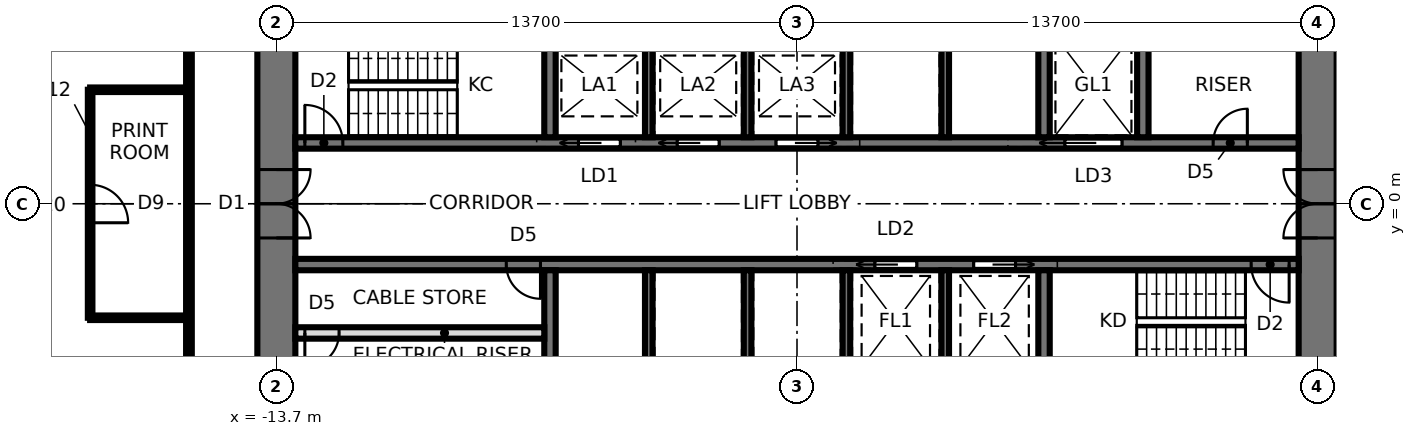
"""IFC4 building model, lengths in metres.
Left out: names, types, materials, properties, quantities, classifications, styles, units other than length and angle.
Written with IfcOpenShell. Run it as: python <this file> out.ifc"""

import sys

from ifc_helpers import new_model, si_unit, direction, frame, frame_2d, origin, place, context, subcontext, project, spatial, rectangle, extrude, element, fill, save


model = new_model("IFC4")
c1 = context("Model", 3, precision=1e-05, world=origin(), true_north=direction((0.0, 1.0)))
c2 = subcontext(c1, "Body", "Model", "MODEL_VIEW")
j1 = project(units=[si_unit("LENGTHUNIT", "METRE"), si_unit("PLANEANGLEUNIT", "RADIAN")], contexts=[c1])
p1 = place(None, origin())
s1 = spatial("IfcSite", under=j1, at=p1, CompositionType="ELEMENT")
p2 = place(p1, origin())
s2 = spatial("IfcBuilding", under=s1, at=p2, CompositionType="ELEMENT")
p3 = place(p2, frame((0.0, 0.0, 78.4)))
s3 = spatial("IfcBuildingStorey", under=s2, at=p3, CompositionType="ELEMENT", Elevation=78.4)
p4 = place(p3, frame((13.7, -9.5, 0.0), z_axis=(0.0, 0.0, 1.0), x_axis=(0.0, 1.0, 0.0)))
e1 = element("IfcWall", 1, at=p4, inside=s3, PredefinedType="SHEAR", context=c2, shape_type="SweptSolid", body=[
    extrude(rectangle(XDim=19.0, YDim=1.0, at=frame_2d((9.5, 0.0))), origin(), (0.0, 0.0, 1.0), 4.2),
])
p5 = place(p4, frame((8.6, 0.0, 0.0)))
e2 = element("IfcOpeningElement", 2, at=p5, cuts=e1, PredefinedType="OPENING", context=c2, shape_type="SweptSolid", body=[
    extrude(rectangle(XDim=1.8, YDim=2.4, at=frame_2d((0.9, 1.2))), frame((0.0, 0.51, 0.0), z_axis=(0.0, -1.0, 0.0), x_axis=(1.0, 0.0, 0.0)), (0.0, 0.0, 1.0), 1.02),
])
p6 = place(p3, frame((-13.7, 9.5, 0.0), z_axis=(0.0, 0.0, 1.0), x_axis=(0.0, -1.0, 0.0)))
e3 = element("IfcWall", 3, at=p6, inside=s3, PredefinedType="SHEAR", context=c2, shape_type="SweptSolid", body=[
    extrude(rectangle(XDim=19.0, YDim=1.0, at=frame_2d((9.5, 0.0))), origin(), (0.0, 0.0, 1.0), 4.2),
])
p7 = place(p6, frame((8.6, 0.0, 0.0)))
e4 = element("IfcOpeningElement", 4, at=p7, cuts=e3, PredefinedType="OPENING", context=c2, shape_type="SweptSolid", body=[
    extrude(rectangle(XDim=1.8, YDim=2.4, at=frame_2d((0.9, 1.2))), frame((0.0, 0.51, 0.0), z_axis=(0.0, -1.0, 0.0), x_axis=(1.0, 0.0, 0.0)), (0.0, 0.0, 1.0), 1.02),
])
p8 = place(p3, frame((-13.2, 1.6, 0.0), z_axis=(0.0, 0.0, 1.0), x_axis=(1.0, 0.0, 0.0)))
e5 = element("IfcWall", 5, at=p8, inside=s3, PredefinedType="SHEAR", context=c2, shape_type="SweptSolid", body=[
    extrude(rectangle(XDim=26.4, YDim=0.3, at=frame_2d((13.2, 0.0))), origin(), (0.0, 0.0, 1.0), 4.2),
])
p9 = place(p8, frame((0.25, 0.0, 0.0)))
e6 = element("IfcOpeningElement", 6, at=p9, cuts=e5, PredefinedType="OPENING", context=c2, shape_type="SweptSolid", body=[
    extrude(rectangle(XDim=1.0, YDim=2.1, at=frame_2d((0.5, 1.05))), frame((0.0, 0.16, 0.0), z_axis=(0.0, -1.0, 0.0), x_axis=(1.0, 0.0, 0.0)), (0.0, 0.0, 1.0), 0.32),
])
p10 = place(p8, frame((20.25, 0.0, 0.0)))
e7 = element("IfcOpeningElement", 7, at=p10, cuts=e5, PredefinedType="OPENING", context=c2, shape_type="SweptSolid", body=[
    extrude(rectangle(XDim=1.5, YDim=2.4, at=frame_2d((0.75, 1.2))), frame((0.0, 0.16, 0.0), z_axis=(0.0, -1.0, 0.0), x_axis=(1.0, 0.0, 0.0)), (0.0, 0.0, 1.0), 0.32),
])
p11 = place(p8, frame((7.45, 0.0, 0.0)))
e8 = element("IfcOpeningElement", 8, at=p11, cuts=e5, PredefinedType="OPENING", context=c2, shape_type="SweptSolid", body=[
    extrude(rectangle(XDim=1.1, YDim=2.3, at=frame_2d((0.55, 1.15))), frame((0.0, 0.16, 0.0), z_axis=(0.0, -1.0, 0.0), x_axis=(1.0, 0.0, 0.0)), (0.0, 0.0, 1.0), 0.32),
])
p12 = place(p8, frame((10.05, 0.0, 0.0)))
e9 = element("IfcOpeningElement", 9, at=p12, cuts=e5, PredefinedType="OPENING", context=c2, shape_type="SweptSolid", body=[
    extrude(rectangle(XDim=1.1, YDim=2.3, at=frame_2d((0.55, 1.15))), frame((0.0, 0.16, 0.0), z_axis=(0.0, -1.0, 0.0), x_axis=(1.0, 0.0, 0.0)), (0.0, 0.0, 1.0), 0.32),
])
p13 = place(p8, frame((12.65, 0.0, 0.0)))
e10 = element("IfcOpeningElement", 10, at=p13, cuts=e5, PredefinedType="OPENING", context=c2, shape_type="SweptSolid", body=[
    extrude(rectangle(XDim=1.1, YDim=2.3, at=frame_2d((0.55, 1.15))), frame((0.0, 0.16, 0.0), z_axis=(0.0, -1.0, 0.0), x_axis=(1.0, 0.0, 0.0)), (0.0, 0.0, 1.0), 0.32),
])
p14 = place(p8, frame((24.15, 0.0, 0.0)))
e11 = element("IfcOpeningElement", 11, at=p14, cuts=e5, PredefinedType="OPENING", context=c2, shape_type="SweptSolid", body=[
    extrude(rectangle(XDim=0.9, YDim=2.1, at=frame_2d((0.45, 1.05))), frame((0.0, 0.16, 0.0), z_axis=(0.0, -1.0, 0.0), x_axis=(1.0, 0.0, 0.0)), (0.0, 0.0, 1.0), 0.32),
])
p15 = place(p3, frame((-13.2, -1.6, 0.0), z_axis=(0.0, 0.0, 1.0), x_axis=(1.0, 0.0, 0.0)))
e12 = element("IfcWall", 12, at=p15, inside=s3, PredefinedType="SHEAR", context=c2, shape_type="SweptSolid", body=[
    extrude(rectangle(XDim=26.4, YDim=0.3, at=frame_2d((13.2, 0.0))), origin(), (0.0, 0.0, 1.0), 4.2),
])
p16 = place(p15, frame((25.15, 0.0, 0.0)))
e13 = element("IfcOpeningElement", 13, at=p16, cuts=e12, PredefinedType="OPENING", context=c2, shape_type="SweptSolid", body=[
    extrude(rectangle(XDim=1.0, YDim=2.1, at=frame_2d((0.5, 1.05))), frame((0.0, 0.16, 0.0), z_axis=(0.0, -1.0, 0.0), x_axis=(1.0, 0.0, 0.0)), (0.0, 0.0, 1.0), 0.32),
])
p17 = place(p15, frame((15.25, 0.0, 0.0)))
e14 = element("IfcOpeningElement", 14, at=p17, cuts=e12, PredefinedType="OPENING", context=c2, shape_type="SweptSolid", body=[
    extrude(rectangle(XDim=1.1, YDim=2.3, at=frame_2d((0.55, 1.15))), frame((0.0, 0.16, 0.0), z_axis=(0.0, -1.0, 0.0), x_axis=(1.0, 0.0, 0.0)), (0.0, 0.0, 1.0), 0.32),
])
p18 = place(p15, frame((17.85, 0.0, 0.0)))
e15 = element("IfcOpeningElement", 15, at=p18, cuts=e12, PredefinedType="OPENING", context=c2, shape_type="SweptSolid", body=[
    extrude(rectangle(XDim=1.1, YDim=2.3, at=frame_2d((0.55, 1.15))), frame((0.0, 0.16, 0.0), z_axis=(0.0, -1.0, 0.0), x_axis=(1.0, 0.0, 0.0)), (0.0, 0.0, 1.0), 0.32),
])
p19 = place(p15, frame((5.55, 0.0, 0.0)))
e16 = element("IfcOpeningElement", 16, at=p19, cuts=e12, PredefinedType="OPENING", context=c2, shape_type="SweptSolid", body=[
    extrude(rectangle(XDim=0.9, YDim=2.1, at=frame_2d((0.45, 1.05))), frame((0.0, 0.16, 0.0), z_axis=(0.0, -1.0, 0.0), x_axis=(1.0, 0.0, 0.0)), (0.0, 0.0, 1.0), 0.32),
])
for number, where, z_axis, x_axis in (
    (17, (-6.5, 1.75, 0.0), (0.0, 0.0, 1.0), (0.0, 1.0, 0.0)),
    (18, (6.5, 1.75, 0.0), (0.0, 0.0, 1.0), (0.0, 1.0, 0.0)),
):
    element("IfcWall", number, at=place(p3, frame(where, z_axis=z_axis, x_axis=x_axis)), inside=s3, PredefinedType="SHEAR", context=c2, shape_type="SweptSolid", body=[
        extrude(rectangle(XDim=2.7, YDim=0.3, at=frame_2d((1.35, 0.0))), origin(), (0.0, 0.0, 1.0), 4.2),
    ])
for number, where, z_axis, x_axis in (
    (19, (-3.9, 1.75, 0.0), (0.0, 0.0, 1.0), (0.0, 1.0, 0.0)),
    (20, (-1.3, 1.75, 0.0), (0.0, 0.0, 1.0), (0.0, 1.0, 0.0)),
    (21, (1.3, 1.75, 0.0), (0.0, 0.0, 1.0), (0.0, 1.0, 0.0)),
    (22, (3.9, 1.75, 0.0), (0.0, 0.0, 1.0), (0.0, 1.0, 0.0)),
):
    element("IfcWall", number, at=place(p3, frame(where, z_axis=z_axis, x_axis=x_axis)), inside=s3, PredefinedType="SHEAR", context=c2, shape_type="SweptSolid", body=[
        extrude(rectangle(XDim=2.7, YDim=0.2, at=frame_2d((1.35, 0.0))), origin(), (0.0, 0.0, 1.0), 4.2),
    ])
for number, where, z_axis, x_axis in (
    (23, (-6.5, -1.75, 0.0), (0.0, 0.0, 1.0), (0.0, -1.0, 0.0)),
    (24, (6.5, -1.75, 0.0), (0.0, 0.0, 1.0), (0.0, -1.0, 0.0)),
):
    element("IfcWall", number, at=place(p3, frame(where, z_axis=z_axis, x_axis=x_axis)), inside=s3, PredefinedType="SHEAR", context=c2, shape_type="SweptSolid", body=[
        extrude(rectangle(XDim=2.7, YDim=0.3, at=frame_2d((1.35, 0.0))), origin(), (0.0, 0.0, 1.0), 4.2),
    ])
for number, where, z_axis, x_axis in (
    (25, (-3.9, -1.75, 0.0), (0.0, 0.0, 1.0), (0.0, -1.0, 0.0)),
    (26, (-1.3, -1.75, 0.0), (0.0, 0.0, 1.0), (0.0, -1.0, 0.0)),
    (27, (1.3, -1.75, 0.0), (0.0, 0.0, 1.0), (0.0, -1.0, 0.0)),
    (28, (3.9, -1.75, 0.0), (0.0, 0.0, 1.0), (0.0, -1.0, 0.0)),
):
    element("IfcWall", number, at=place(p3, frame(where, z_axis=z_axis, x_axis=x_axis)), inside=s3, PredefinedType="SHEAR", context=c2, shape_type="SweptSolid", body=[
        extrude(rectangle(XDim=2.7, YDim=0.2, at=frame_2d((1.35, 0.0))), origin(), (0.0, 0.0, 1.0), 4.2),
    ])
p20 = place(p3, frame((9.1, 1.75, 0.0), z_axis=(0.0, 0.0, 1.0), x_axis=(0.0, 1.0, 0.0)))
e29 = element("IfcWall", 29, at=p20, inside=s3, PredefinedType="SHEAR", context=c2, shape_type="SweptSolid", body=[
    extrude(rectangle(XDim=2.7, YDim=0.3, at=frame_2d((1.35, 0.0))), origin(), (0.0, 0.0, 1.0), 4.2),
])
p21 = place(p3, frame((-13.2, -3.4, 0.0), z_axis=(0.0, 0.0, 1.0), x_axis=(1.0, 0.0, 0.0)))
e30 = element("IfcWall", 30, at=p21, inside=s3, PredefinedType="SOLIDWALL", context=c2, shape_type="SweptSolid", body=[
    extrude(rectangle(XDim=6.55, YDim=0.3, at=frame_2d((3.275, 0.0))), origin(), (0.0, 0.0, 1.0), 4.04),
])
p22 = place(p21, frame((0.25, 0.0, 0.0)))
e31 = element("IfcOpeningElement", 31, at=p22, cuts=e30, PredefinedType="OPENING", context=c2, shape_type="SweptSolid", body=[
    extrude(rectangle(XDim=0.9, YDim=2.1, at=frame_2d((0.45, 1.05))), frame((0.0, 0.16, 0.0), z_axis=(0.0, -1.0, 0.0), x_axis=(1.0, 0.0, 0.0)), (0.0, 0.0, 1.0), 0.32),
])
for number, where, z_axis, x_axis in (
    (32, (-18.6, -3.0, 0.0), (0.0, 0.0, 1.0), (1.0, 0.0, 0.0)),
    (33, (-16.0, 3.0, 0.0), (0.0, 0.0, 1.0), (-1.0, 0.0, 0.0)),
):
    element("IfcWall", number, at=place(p3, frame(where, z_axis=z_axis, x_axis=x_axis)), inside=s3, PredefinedType="PARTITIONING", context=c2, shape_type="SweptSolid", body=[
        extrude(rectangle(XDim=2.6, YDim=0.12, at=frame_2d((1.3, 0.0))), origin(), (0.0, 0.0, 1.0), 4.04),
    ])
p23 = place(p3, frame((-18.6, 3.0, 0.0), z_axis=(0.0, 0.0, 1.0), x_axis=(0.0, -1.0, 0.0)))
e34 = element("IfcWall", 34, at=p23, inside=s3, PredefinedType="PARTITIONING", context=c2, shape_type="SweptSolid", body=[
    extrude(rectangle(XDim=6.0, YDim=0.12, at=frame_2d((3.0, 0.0))), origin(), (0.0, 0.0, 1.0), 4.04),
])
p24 = place(p23, frame((2.5, 0.0, 0.0)))
e35 = element("IfcOpeningElement", 35, at=p24, cuts=e34, PredefinedType="OPENING", context=c2, shape_type="SweptSolid", body=[
    extrude(rectangle(XDim=1.0, YDim=2.4, at=frame_2d((0.5, 1.2))), frame((0.0, 0.07, 0.0), z_axis=(0.0, -1.0, 0.0), x_axis=(1.0, 0.0, 0.0)), (0.0, 0.0, 1.0), 0.14),
])
p25 = place(p3, frame((-16.0, 11.3, 0.0), z_axis=(0.0, 0.0, 1.0), x_axis=(0.0, -1.0, 0.0)))
e36 = element("IfcWall", 36, at=p25, inside=s3, PredefinedType="PARTITIONING", context=c2, shape_type="SweptSolid", body=[
    extrude(rectangle(XDim=22.6, YDim=0.15, at=frame_2d((11.3, 0.0))), origin(), (0.0, 0.0, 1.0), 4.04),
])
p26 = place(p25, frame((17.85, 0.0, 0.0)))
e37 = element("IfcOpeningElement", 37, at=p26, cuts=e36, PredefinedType="OPENING", context=c2, shape_type="SweptSolid", body=[
    extrude(rectangle(XDim=1.2, YDim=2.4, at=frame_2d((0.6, 1.2))), frame((0.0, 0.085, 0.0), z_axis=(0.0, -1.0, 0.0), x_axis=(1.0, 0.0, 0.0)), (0.0, 0.0, 1.0), 0.17),
])
p27 = place(p7, origin())
e38 = element("IfcDoor", 38, at=p27, inside=s3, OperationType="DOUBLE_DOOR_SINGLE_SWING", PredefinedType="DOOR", context=c2, shape_type="SweptSolid", body=[
    extrude(rectangle(XDim=1.72, YDim=2.36, at=frame_2d((0.9, 1.18))), frame((0.0, 0.025, 0.0), z_axis=(0.0, -1.0, 0.0), x_axis=(1.0, 0.0, 0.0)), (0.0, 0.0, 1.0), 0.05),
    extrude(rectangle(XDim=0.04, YDim=2.4, at=frame_2d((0.02, 1.2))), frame((0.0, 0.25, 0.0), z_axis=(0.0, -1.0, 0.0), x_axis=(1.0, 0.0, 0.0)), (0.0, 0.0, 1.0), 0.5),
    extrude(rectangle(XDim=0.04, YDim=2.4, at=frame_2d((1.78, 1.2))), frame((0.0, 0.25, 0.0), z_axis=(0.0, -1.0, 0.0), x_axis=(1.0, 0.0, 0.0)), (0.0, 0.0, 1.0), 0.5),
    extrude(rectangle(XDim=1.72, YDim=0.04, at=frame_2d((0.9, 2.38))), frame((0.0, 0.25, 0.0), z_axis=(0.0, -1.0, 0.0), x_axis=(1.0, 0.0, 0.0)), (0.0, 0.0, 1.0), 0.5),
])
fill(e4, e38)
p28 = place(p5, origin())
e39 = element("IfcDoor", 39, at=p28, inside=s3, OperationType="DOUBLE_DOOR_SINGLE_SWING", PredefinedType="DOOR", context=c2, shape_type="SweptSolid", body=[
    extrude(rectangle(XDim=1.72, YDim=2.36, at=frame_2d((0.9, 1.18))), frame((0.0, 0.025, 0.0), z_axis=(0.0, -1.0, 0.0), x_axis=(1.0, 0.0, 0.0)), (0.0, 0.0, 1.0), 0.05),
    extrude(rectangle(XDim=0.04, YDim=2.4, at=frame_2d((0.02, 1.2))), frame((0.0, 0.25, 0.0), z_axis=(0.0, -1.0, 0.0), x_axis=(1.0, 0.0, 0.0)), (0.0, 0.0, 1.0), 0.5),
    extrude(rectangle(XDim=0.04, YDim=2.4, at=frame_2d((1.78, 1.2))), frame((0.0, 0.25, 0.0), z_axis=(0.0, -1.0, 0.0), x_axis=(1.0, 0.0, 0.0)), (0.0, 0.0, 1.0), 0.5),
    extrude(rectangle(XDim=1.72, YDim=0.04, at=frame_2d((0.9, 2.38))), frame((0.0, 0.25, 0.0), z_axis=(0.0, -1.0, 0.0), x_axis=(1.0, 0.0, 0.0)), (0.0, 0.0, 1.0), 0.5),
])
fill(e2, e39)
p29 = place(p9, origin())
e40 = element("IfcDoor", 40, at=p29, inside=s3, OperationType="SINGLE_SWING_LEFT", PredefinedType="DOOR", context=c2, shape_type="SweptSolid", body=[
    extrude(rectangle(XDim=1.0, YDim=2.1, at=frame_2d((0.5, 1.05))), frame((0.0, 0.025, 0.0), z_axis=(0.0, -1.0, 0.0), x_axis=(1.0, 0.0, 0.0)), (0.0, 0.0, 1.0), 0.05),
])
fill(e6, e40)
p30 = place(p16, frame((1.0, 0.0, 0.0), z_axis=(0.0, 0.0, 1.0), x_axis=(-1.0, 0.0, 0.0)))
e41 = element("IfcDoor", 41, at=p30, inside=s3, OperationType="SINGLE_SWING_LEFT", PredefinedType="DOOR", context=c2, shape_type="SweptSolid", body=[
    extrude(rectangle(XDim=1.0, YDim=2.1, at=frame_2d((0.5, 1.05))), frame((0.0, 0.025, 0.0), z_axis=(0.0, -1.0, 0.0), x_axis=(1.0, 0.0, 0.0)), (0.0, 0.0, 1.0), 0.05),
])
fill(e13, e41)
p31 = place(p10, origin())
e42 = element("IfcDoor", 42, at=p31, inside=s3, OperationType="SLIDING_TO_LEFT", PredefinedType="DOOR", context=c2, shape_type="SweptSolid", body=[
    extrude(rectangle(XDim=1.5, YDim=2.4, at=frame_2d((0.75, 1.2))), frame((0.0, 0.025, 0.0), z_axis=(0.0, -1.0, 0.0), x_axis=(1.0, 0.0, 0.0)), (0.0, 0.0, 1.0), 0.05),
])
fill(e7, e42)
p32 = place(p11, origin())
e43 = element("IfcDoor", 43, at=p32, inside=s3, OperationType="SLIDING_TO_LEFT", PredefinedType="DOOR", context=c2, shape_type="SweptSolid", body=[
    extrude(rectangle(XDim=1.1, YDim=2.3, at=frame_2d((0.55, 1.15))), frame((0.0, 0.025, 0.0), z_axis=(0.0, -1.0, 0.0), x_axis=(1.0, 0.0, 0.0)), (0.0, 0.0, 1.0), 0.05),
])
fill(e8, e43)
p33 = place(p12, origin())
e44 = element("IfcDoor", 44, at=p33, inside=s3, OperationType="SLIDING_TO_LEFT", PredefinedType="DOOR", context=c2, shape_type="SweptSolid", body=[
    extrude(rectangle(XDim=1.1, YDim=2.3, at=frame_2d((0.55, 1.15))), frame((0.0, 0.025, 0.0), z_axis=(0.0, -1.0, 0.0), x_axis=(1.0, 0.0, 0.0)), (0.0, 0.0, 1.0), 0.05),
])
fill(e9, e44)
p34 = place(p13, origin())
e45 = element("IfcDoor", 45, at=p34, inside=s3, OperationType="SLIDING_TO_RIGHT", PredefinedType="DOOR", context=c2, shape_type="SweptSolid", body=[
    extrude(rectangle(XDim=1.1, YDim=2.3, at=frame_2d((0.55, 1.15))), frame((0.0, 0.025, 0.0), z_axis=(0.0, -1.0, 0.0), x_axis=(1.0, 0.0, 0.0)), (0.0, 0.0, 1.0), 0.05),
])
fill(e10, e45)
p35 = place(p17, frame((1.1, 0.0, 0.0), z_axis=(0.0, 0.0, 1.0), x_axis=(-1.0, 0.0, 0.0)))
e46 = element("IfcDoor", 46, at=p35, inside=s3, OperationType="SLIDING_TO_RIGHT", PredefinedType="DOOR", context=c2, shape_type="SweptSolid", body=[
    extrude(rectangle(XDim=1.1, YDim=2.3, at=frame_2d((0.55, 1.15))), frame((0.0, 0.025, 0.0), z_axis=(0.0, -1.0, 0.0), x_axis=(1.0, 0.0, 0.0)), (0.0, 0.0, 1.0), 0.05),
])
fill(e14, e46)
p36 = place(p18, frame((1.1, 0.0, 0.0), z_axis=(0.0, 0.0, 1.0), x_axis=(-1.0, 0.0, 0.0)))
e47 = element("IfcDoor", 47, at=p36, inside=s3, OperationType="SLIDING_TO_LEFT", PredefinedType="DOOR", context=c2, shape_type="SweptSolid", body=[
    extrude(rectangle(XDim=1.1, YDim=2.3, at=frame_2d((0.55, 1.15))), frame((0.0, 0.025, 0.0), z_axis=(0.0, -1.0, 0.0), x_axis=(1.0, 0.0, 0.0)), (0.0, 0.0, 1.0), 0.05),
])
fill(e15, e47)
p37 = place(p14, origin())
e48 = element("IfcDoor", 48, at=p37, inside=s3, OperationType="SINGLE_SWING_RIGHT", PredefinedType="DOOR", context=c2, shape_type="SweptSolid", body=[
    extrude(rectangle(XDim=0.9, YDim=2.1, at=frame_2d((0.45, 1.05))), frame((0.0, 0.025, 0.0), z_axis=(0.0, -1.0, 0.0), x_axis=(1.0, 0.0, 0.0)), (0.0, 0.0, 1.0), 0.05),
])
fill(e11, e48)
p38 = place(p19, frame((0.9, 0.0, 0.0), z_axis=(0.0, 0.0, 1.0), x_axis=(-1.0, 0.0, 0.0)))
e49 = element("IfcDoor", 49, at=p38, inside=s3, OperationType="SINGLE_SWING_LEFT", PredefinedType="DOOR", context=c2, shape_type="SweptSolid", body=[
    extrude(rectangle(XDim=0.9, YDim=2.1, at=frame_2d((0.45, 1.05))), frame((0.0, 0.025, 0.0), z_axis=(0.0, -1.0, 0.0), x_axis=(1.0, 0.0, 0.0)), (0.0, 0.0, 1.0), 0.05),
])
fill(e16, e49)
p39 = place(p22, frame((0.9, 0.0, 0.0), z_axis=(0.0, 0.0, 1.0), x_axis=(-1.0, 0.0, 0.0)))
e50 = element("IfcDoor", 50, at=p39, inside=s3, OperationType="SINGLE_SWING_RIGHT", PredefinedType="DOOR", context=c2, shape_type="SweptSolid", body=[
    extrude(rectangle(XDim=0.9, YDim=2.1, at=frame_2d((0.45, 1.05))), frame((0.0, 0.025, 0.0), z_axis=(0.0, -1.0, 0.0), x_axis=(1.0, 0.0, 0.0)), (0.0, 0.0, 1.0), 0.05),
])
fill(e31, e50)
p40 = place(p24, origin())
e51 = element("IfcDoor", 51, at=p40, inside=s3, OperationType="SINGLE_SWING_RIGHT", PredefinedType="DOOR", context=c2, shape_type="SweptSolid", body=[
    extrude(rectangle(XDim=1.0, YDim=2.4, at=frame_2d((0.5, 1.2))), frame((0.0, 0.025, 0.0), z_axis=(0.0, -1.0, 0.0), x_axis=(1.0, 0.0, 0.0)), (0.0, 0.0, 1.0), 0.05),
])
fill(e35, e51)
save(model, sys.argv[1])
